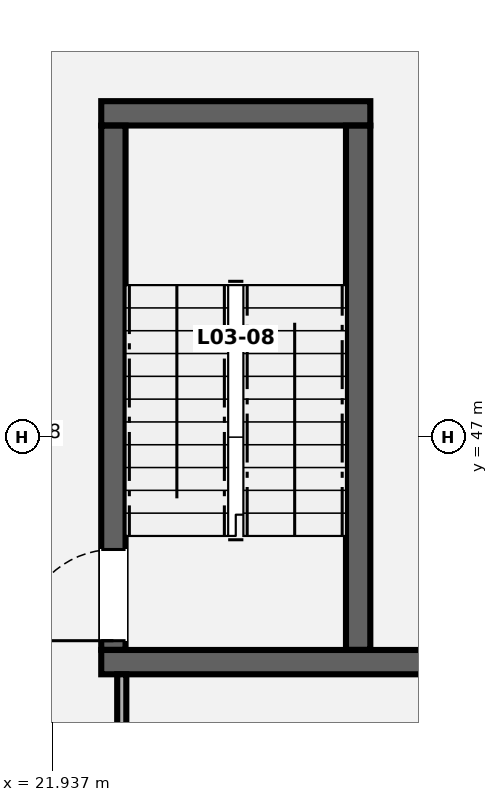
"""IFC4 building model, lengths in metres.
Left out: names, types, materials, properties, quantities, classifications, styles, units other than length and angle.
Written with IfcOpenShell. Run it as: python <this file> out.ifc"""

import sys

from ifc_helpers import new_model, si_unit, direction, frame, frame_2d, origin, place, context, subcontext, project, spatial, rectangle, extrude, element, fill, save


model = new_model("IFC4")
c1 = context("Model", 3, precision=1e-05, world=origin(), true_north=direction((0.0, 1.0)))
c2 = subcontext(c1, "Body", "Model", "MODEL_VIEW")
j1 = project(units=[si_unit("LENGTHUNIT", "METRE"), si_unit("PLANEANGLEUNIT", "RADIAN")], contexts=[c1])
p1 = place(None, origin())
s1 = spatial("IfcSite", under=j1, at=p1, CompositionType="ELEMENT")
p2 = place(p1, origin())
s2 = spatial("IfcBuilding", under=s1, at=p2, CompositionType="ELEMENT")
p3 = place(p2, frame((0.0, 0.0, 13.3)))
s3 = spatial("IfcBuildingStorey", under=s2, at=p3, CompositionType="ELEMENT", Elevation=13.3)
p4 = place(p3, frame((22.58, 44.04, 0.0), z_axis=(0.0, 0.0, 1.0), x_axis=(1.0, 0.0, 0.0)))
e1 = element("IfcWall", 1, at=p4, inside=s3, PredefinedType="SHEAR", context=c2, shape_type="SweptSolid", body=[
    extrude(rectangle(XDim=4.485, YDim=0.32, at=frame_2d((2.242, 0.0))), origin(), (0.0, 0.0, 1.0), 4.0),
])
p5 = place(p3, frame((22.58, 51.26, 0.0), z_axis=(0.0, 0.0, 1.0), x_axis=(1.0, 0.0, 0.0)))
e2 = element("IfcWall", 2, at=p5, inside=s3, PredefinedType="SHEAR", context=c2, shape_type="SweptSolid", body=[
    extrude(rectangle(XDim=3.54, YDim=0.32, at=frame_2d((1.77, 0.0))), origin(), (0.0, 0.0, 1.0), 4.0),
])
p6 = place(p3, frame((22.74, 44.202, 0.0), z_axis=(0.0, 0.0, 1.0), x_axis=(0.0, 1.0, 0.0)))
e3 = element("IfcWall", 3, at=p6, inside=s3, PredefinedType="SHEAR", context=c2, shape_type="SweptSolid", body=[
    extrude(rectangle(XDim=6.896, YDim=0.32, at=frame_2d((3.448, 0.0))), origin(), (0.0, 0.0, 1.0), 4.0),
])
p7 = place(p6, frame((0.12, 0.0, 0.0)))
e4 = element("IfcOpeningElement", 4, at=p7, cuts=e3, PredefinedType="OPENING", context=c2, shape_type="SweptSolid", body=[
    extrude(rectangle(XDim=1.2, YDim=2.15, at=frame_2d((0.6, 1.075))), frame((0.0, 0.17, 0.0), z_axis=(0.0, -1.0, 0.0), x_axis=(1.0, 0.0, 0.0)), (0.0, 0.0, 1.0), 0.34),
])
p8 = place(p3, frame((25.96, 44.202, 0.0), z_axis=(0.0, 0.0, 1.0), x_axis=(0.0, 1.0, 0.0)))
e5 = element("IfcWall", 5, at=p8, inside=s3, PredefinedType="SHEAR", context=c2, shape_type="SweptSolid", body=[
    extrude(rectangle(XDim=6.896, YDim=0.32, at=frame_2d((3.448, 0.0))), origin(), (0.0, 0.0, 1.0), 4.0),
])
p9 = place(p3, frame((22.85, 31.2, 0.0), z_axis=(0.0, 0.0, 1.0), x_axis=(0.0, 1.0, 0.0)))
e6 = element("IfcWall", 6, at=p9, inside=s3, PredefinedType="PARTITIONING", context=c2, shape_type="SweptSolid", body=[
    extrude(rectangle(XDim=12.68, YDim=0.12, at=frame_2d((6.34, 0.0))), origin(), (0.0, 0.0, 1.0), 4.0),
])
p10 = place(p9, frame((5.8, 0.0, 0.0)))
e7 = element("IfcOpeningElement", 7, at=p10, cuts=e6, PredefinedType="OPENING", context=c2, shape_type="SweptSolid", body=[
    extrude(rectangle(XDim=1.08, YDim=2.12, at=frame_2d((0.54, 1.06))), frame((0.0, 0.07, 0.0), z_axis=(0.0, -1.0, 0.0), x_axis=(1.0, 0.0, 0.0)), (0.0, 0.0, 1.0), 0.14),
])
p11 = place(p7, origin())
e8 = element("IfcDoor", 8, at=p11, inside=s3, OperationType="SINGLE_SWING_LEFT", PredefinedType="DOOR", context=c2, shape_type="SweptSolid", body=[
    extrude(rectangle(XDim=1.2, YDim=2.15, at=frame_2d((0.6, 1.075))), frame((0.0, 0.025, 0.0), z_axis=(0.0, -1.0, 0.0), x_axis=(1.0, 0.0, 0.0)), (0.0, 0.0, 1.0), 0.05),
])
fill(e4, e8)
save(model, sys.argv[1])
